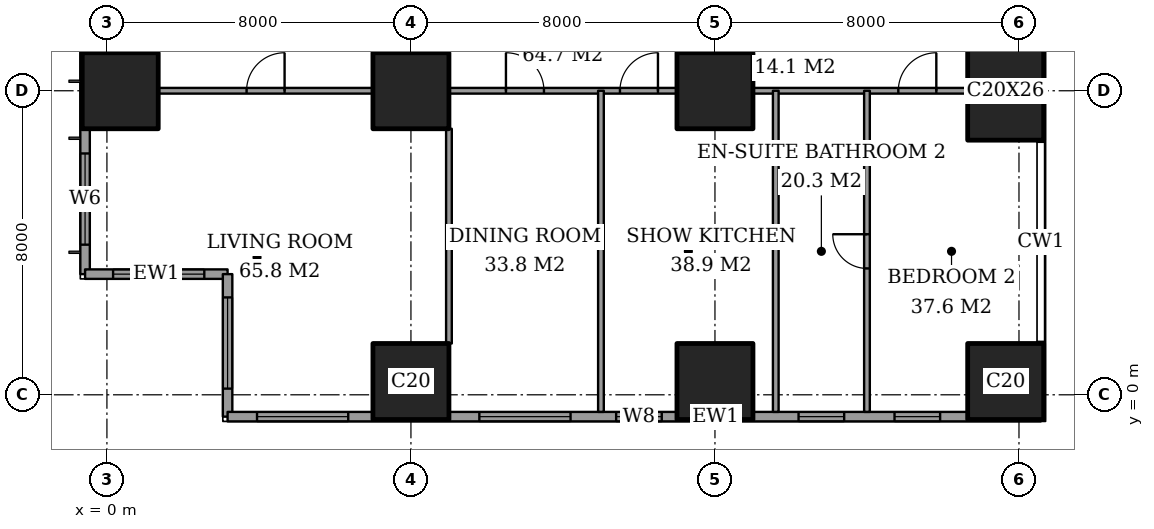
"""IFC4 building model, lengths in metres.
Left out: names, types, materials, properties, quantities, classifications, styles, units other than length and angle.
Written with IfcOpenShell. Run it as: python <this file> out.ifc"""

import sys

from ifc_helpers import new_model, si_unit, direction, frame, frame_2d, origin, origin_2d, place, context, subcontext, project, spatial, rectangle, extrude, element, fill, save


model = new_model("IFC4")
c1 = context("Model", 3, precision=1e-05, world=origin(), true_north=direction((0.0, 1.0)))
c2 = subcontext(c1, "Body", "Model", "MODEL_VIEW")
j1 = project(units=[si_unit("LENGTHUNIT", "METRE"), si_unit("PLANEANGLEUNIT", "RADIAN")], contexts=[c1])
p1 = place(None, origin())
s1 = spatial("IfcSite", under=j1, at=p1, CompositionType="ELEMENT")
p2 = place(p1, origin())
s2 = spatial("IfcBuilding", under=s1, at=p2, CompositionType="ELEMENT")
p3 = place(p2, frame((0.0, 0.0, 54.8)))
s3 = spatial("IfcBuildingStorey", under=s2, at=p3, CompositionType="ELEMENT", Elevation=54.8)
for number, where, z_axis, x_axis in (
    (1, (0.35, 8.0, 0.0), (0.0, 0.0, 1.0), (1.0, 0.0, 0.0)),
    (2, (8.0, 0.35, 0.0), (0.0, 0.0, 1.0), (1.0, 0.0, 0.0)),
    (3, (8.0, 8.0, 0.0), (0.0, 0.0, 1.0), (1.0, 0.0, 0.0)),
    (4, (16.0, 0.35, 0.0), (0.0, 0.0, 1.0), (1.0, 0.0, 0.0)),
    (5, (16.0, 8.0, 0.0), (0.0, 0.0, 1.0), (1.0, 0.0, 0.0)),
    (6, (23.65, 0.35, 0.0), (0.0, 0.0, 1.0), (1.0, 0.0, 0.0)),
):
    element("IfcColumn", number, at=place(p3, frame(where, z_axis=z_axis, x_axis=x_axis)), inside=s3, PredefinedType="COLUMN", context=c2, shape_type="SweptSolid", body=[
        extrude(rectangle(XDim=2.0, YDim=2.0, at=origin_2d()), origin(), (0.0, 0.0, 1.0), 3.6),
    ])
p4 = place(p3, frame((23.65, 8.0, 0.0), z_axis=(0.0, 0.0, 1.0), x_axis=(1.0, 0.0, 0.0)))
e7 = element("IfcColumn", 7, at=p4, inside=s3, PredefinedType="COLUMN", context=c2, shape_type="SweptSolid", body=[
    extrude(rectangle(XDim=2.0, YDim=2.6, at=origin_2d()), origin(), (0.0, 0.0, 1.0), 3.6),
])
p5 = place(p3, frame((-0.575, 44.825, 0.0), z_axis=(0.0, 0.0, 1.0), x_axis=(0.0, -1.0, 0.0)))
e8 = element("IfcWall", 8, at=p5, inside=s3, PredefinedType="SOLIDWALL", context=c2, shape_type="SweptSolid", body=[
    extrude(rectangle(XDim=41.65, YDim=0.25, at=frame_2d((20.825, 0.0))), origin(), (0.0, 0.0, 1.0), 3.6),
])
p6 = place(p5, frame((0.775, 0.0, 0.6)))
e9 = element("IfcOpeningElement", 9, at=p6, cuts=e8, PredefinedType="OPENING", context=c2, shape_type="SweptSolid", body=[
    extrude(rectangle(XDim=2.4, YDim=2.0, at=frame_2d((1.2, 1.0))), frame((0.0, 0.135, 0.0), z_axis=(0.0, -1.0, 0.0), x_axis=(1.0, 0.0, 0.0)), (0.0, 0.0, 1.0), 0.27),
])
p7 = place(p5, frame((6.1, 0.0, 0.6)))
e10 = element("IfcOpeningElement", 10, at=p7, cuts=e8, PredefinedType="OPENING", context=c2, shape_type="SweptSolid", body=[
    extrude(rectangle(XDim=1.2, YDim=2.0, at=frame_2d((0.6, 1.0))), frame((0.0, 0.135, 0.0), z_axis=(0.0, -1.0, 0.0), x_axis=(1.0, 0.0, 0.0)), (0.0, 0.0, 1.0), 0.27),
])
p8 = place(p5, frame((8.425, 0.0, 0.6)))
e11 = element("IfcOpeningElement", 11, at=p8, cuts=e8, PredefinedType="OPENING", context=c2, shape_type="SweptSolid", body=[
    extrude(rectangle(XDim=2.4, YDim=2.0, at=frame_2d((1.2, 1.0))), frame((0.0, 0.135, 0.0), z_axis=(0.0, -1.0, 0.0), x_axis=(1.0, 0.0, 0.0)), (0.0, 0.0, 1.0), 0.27),
])
p9 = place(p5, frame((15.625, 0.0, 0.6)))
e12 = element("IfcOpeningElement", 12, at=p9, cuts=e8, PredefinedType="OPENING", context=c2, shape_type="SweptSolid", body=[
    extrude(rectangle(XDim=2.4, YDim=2.0, at=frame_2d((1.2, 1.0))), frame((0.0, 0.135, 0.0), z_axis=(0.0, -1.0, 0.0), x_axis=(1.0, 0.0, 0.0)), (0.0, 0.0, 1.0), 0.27),
])
p10 = place(p5, frame((23.625, 0.0, 0.6)))
e13 = element("IfcOpeningElement", 13, at=p10, cuts=e8, PredefinedType="OPENING", context=c2, shape_type="SweptSolid", body=[
    extrude(rectangle(XDim=2.4, YDim=2.0, at=frame_2d((1.2, 1.0))), frame((0.0, 0.135, 0.0), z_axis=(0.0, -1.0, 0.0), x_axis=(1.0, 0.0, 0.0)), (0.0, 0.0, 1.0), 0.27),
])
p11 = place(p5, frame((30.825, 0.0, 0.6)))
e14 = element("IfcOpeningElement", 14, at=p11, cuts=e8, PredefinedType="OPENING", context=c2, shape_type="SweptSolid", body=[
    extrude(rectangle(XDim=2.4, YDim=2.0, at=frame_2d((1.2, 1.0))), frame((0.0, 0.135, 0.0), z_axis=(0.0, -1.0, 0.0), x_axis=(1.0, 0.0, 0.0)), (0.0, 0.0, 1.0), 0.27),
])
p12 = place(p5, frame((34.5, 0.0, 0.6)))
e15 = element("IfcOpeningElement", 15, at=p12, cuts=e8, PredefinedType="OPENING", context=c2, shape_type="SweptSolid", body=[
    extrude(rectangle(XDim=1.2, YDim=2.0, at=frame_2d((0.6, 1.0))), frame((0.0, 0.135, 0.0), z_axis=(0.0, -1.0, 0.0), x_axis=(1.0, 0.0, 0.0)), (0.0, 0.0, 1.0), 0.27),
])
p13 = place(p5, frame((38.475, 0.0, 0.6)))
e16 = element("IfcOpeningElement", 16, at=p13, cuts=e8, PredefinedType="OPENING", context=c2, shape_type="SweptSolid", body=[
    extrude(rectangle(XDim=2.4, YDim=2.0, at=frame_2d((1.2, 1.0))), frame((0.0, 0.135, 0.0), z_axis=(0.0, -1.0, 0.0), x_axis=(1.0, 0.0, 0.0)), (0.0, 0.0, 1.0), 0.27),
])
p14 = place(p3, frame((-0.575, 3.175, 0.0), z_axis=(0.0, 0.0, 1.0), x_axis=(1.0, 0.0, 0.0)))
e17 = element("IfcWall", 17, at=p14, inside=s3, PredefinedType="SOLIDWALL", context=c2, shape_type="SweptSolid", body=[
    extrude(rectangle(XDim=3.75, YDim=0.25, at=frame_2d((1.875, 0.0))), origin(), (0.0, 0.0, 1.0), 3.6),
])
p15 = place(p14, frame((0.738, 0.0, 0.6)))
e18 = element("IfcOpeningElement", 18, at=p15, cuts=e17, PredefinedType="OPENING", context=c2, shape_type="SweptSolid", body=[
    extrude(rectangle(XDim=2.4, YDim=2.0, at=frame_2d((1.2, 1.0))), frame((0.0, 0.135, 0.0), z_axis=(0.0, -1.0, 0.0), x_axis=(1.0, 0.0, 0.0)), (0.0, 0.0, 1.0), 0.27),
])
p16 = place(p3, frame((3.175, 3.175, 0.0), z_axis=(0.0, 0.0, 1.0), x_axis=(0.0, -1.0, 0.0)))
e19 = element("IfcWall", 19, at=p16, inside=s3, PredefinedType="SOLIDWALL", context=c2, shape_type="SweptSolid", body=[
    extrude(rectangle(XDim=3.75, YDim=0.25, at=frame_2d((1.875, 0.0))), origin(), (0.0, 0.0, 1.0), 3.6),
])
p17 = place(p16, frame((0.613, 0.0, 0.6)))
e20 = element("IfcOpeningElement", 20, at=p17, cuts=e19, PredefinedType="OPENING", context=c2, shape_type="SweptSolid", body=[
    extrude(rectangle(XDim=2.4, YDim=2.0, at=frame_2d((1.2, 1.0))), frame((0.0, 0.135, 0.0), z_axis=(0.0, -1.0, 0.0), x_axis=(1.0, 0.0, 0.0)), (0.0, 0.0, 1.0), 0.27),
])
p18 = place(p3, frame((3.175, -0.575, 0.0), z_axis=(0.0, 0.0, 1.0), x_axis=(1.0, 0.0, 0.0)))
e21 = element("IfcWall", 21, at=p18, inside=s3, PredefinedType="SOLIDWALL", context=c2, shape_type="SweptSolid", body=[
    extrude(rectangle(XDim=21.4, YDim=0.25, at=frame_2d((10.7, 0.0))), origin(), (0.0, 0.0, 1.0), 3.6),
])
p19 = place(p18, frame((0.775, 0.0, 0.6)))
e22 = element("IfcOpeningElement", 22, at=p19, cuts=e21, PredefinedType="OPENING", context=c2, shape_type="SweptSolid", body=[
    extrude(rectangle(XDim=2.4, YDim=2.0, at=frame_2d((1.2, 1.0))), frame((0.0, 0.135, 0.0), z_axis=(0.0, -1.0, 0.0), x_axis=(1.0, 0.0, 0.0)), (0.0, 0.0, 1.0), 0.27),
])
p20 = place(p18, frame((6.625, 0.0, 0.6)))
e23 = element("IfcOpeningElement", 23, at=p20, cuts=e21, PredefinedType="OPENING", context=c2, shape_type="SweptSolid", body=[
    extrude(rectangle(XDim=2.4, YDim=2.0, at=frame_2d((1.2, 1.0))), frame((0.0, 0.135, 0.0), z_axis=(0.0, -1.0, 0.0), x_axis=(1.0, 0.0, 0.0)), (0.0, 0.0, 1.0), 0.27),
])
p21 = place(p18, frame((10.225, 0.0, 0.6)))
e24 = element("IfcOpeningElement", 24, at=p21, cuts=e21, PredefinedType="OPENING", context=c2, shape_type="SweptSolid", body=[
    extrude(rectangle(XDim=1.2, YDim=2.0, at=frame_2d((0.6, 1.0))), frame((0.0, 0.135, 0.0), z_axis=(0.0, -1.0, 0.0), x_axis=(1.0, 0.0, 0.0)), (0.0, 0.0, 1.0), 0.27),
])
p22 = place(p18, frame((15.025, 0.0, 0.6)))
e25 = element("IfcOpeningElement", 25, at=p22, cuts=e21, PredefinedType="OPENING", context=c2, shape_type="SweptSolid", body=[
    extrude(rectangle(XDim=1.2, YDim=2.0, at=frame_2d((0.6, 1.0))), frame((0.0, 0.135, 0.0), z_axis=(0.0, -1.0, 0.0), x_axis=(1.0, 0.0, 0.0)), (0.0, 0.0, 1.0), 0.27),
])
p23 = place(p18, frame((17.55, 0.0, 0.6)))
e26 = element("IfcOpeningElement", 26, at=p23, cuts=e21, PredefinedType="OPENING", context=c2, shape_type="SweptSolid", body=[
    extrude(rectangle(XDim=1.2, YDim=2.0, at=frame_2d((0.6, 1.0))), frame((0.0, 0.135, 0.0), z_axis=(0.0, -1.0, 0.0), x_axis=(1.0, 0.0, 0.0)), (0.0, 0.0, 1.0), 0.27),
])
p24 = place(p3, frame((1.35, 8.0, 0.0), z_axis=(0.0, 0.0, 1.0), x_axis=(1.0, 0.0, 0.0)))
e27 = element("IfcWall", 27, at=p24, inside=s3, PredefinedType="PARTITIONING", context=c2, shape_type="SweptSolid", body=[
    extrude(rectangle(XDim=5.65, YDim=0.15, at=frame_2d((2.825, 0.0))), origin(), (0.0, 0.0, 1.0), 3.35),
])
p25 = place(p24, frame((2.325, 0.0, 0.0)))
e28 = element("IfcOpeningElement", 28, at=p25, cuts=e27, PredefinedType="OPENING", context=c2, shape_type="SweptSolid", body=[
    extrude(rectangle(XDim=1.0, YDim=2.1, at=frame_2d((0.5, 1.05))), frame((0.0, 0.085, 0.0), z_axis=(0.0, -1.0, 0.0), x_axis=(1.0, 0.0, 0.0)), (0.0, 0.0, 1.0), 0.17),
])
p26 = place(p3, frame((9.0, 8.0, 0.0), z_axis=(0.0, 0.0, 1.0), x_axis=(1.0, 0.0, 0.0)))
e29 = element("IfcWall", 29, at=p26, inside=s3, PredefinedType="PARTITIONING", context=c2, shape_type="SweptSolid", body=[
    extrude(rectangle(XDim=6.0, YDim=0.15, at=frame_2d((3.0, 0.0))), origin(), (0.0, 0.0, 1.0), 3.35),
])
p27 = place(p26, frame((1.5, 0.0, 0.0)))
e30 = element("IfcOpeningElement", 30, at=p27, cuts=e29, PredefinedType="OPENING", context=c2, shape_type="SweptSolid", body=[
    extrude(rectangle(XDim=1.0, YDim=2.1, at=frame_2d((0.5, 1.05))), frame((0.0, 0.085, 0.0), z_axis=(0.0, -1.0, 0.0), x_axis=(1.0, 0.0, 0.0)), (0.0, 0.0, 1.0), 0.17),
])
p28 = place(p26, frame((4.5, 0.0, 0.0)))
e31 = element("IfcOpeningElement", 31, at=p28, cuts=e29, PredefinedType="OPENING", context=c2, shape_type="SweptSolid", body=[
    extrude(rectangle(XDim=1.0, YDim=2.1, at=frame_2d((0.5, 1.05))), frame((0.0, 0.085, 0.0), z_axis=(0.0, -1.0, 0.0), x_axis=(1.0, 0.0, 0.0)), (0.0, 0.0, 1.0), 0.17),
])
p29 = place(p3, frame((17.0, 8.0, 0.0), z_axis=(0.0, 0.0, 1.0), x_axis=(1.0, 0.0, 0.0)))
e32 = element("IfcWall", 32, at=p29, inside=s3, PredefinedType="PARTITIONING", context=c2, shape_type="SweptSolid", body=[
    extrude(rectangle(XDim=5.65, YDim=0.15, at=frame_2d((2.825, 0.0))), origin(), (0.0, 0.0, 1.0), 3.35),
])
p30 = place(p29, frame((3.825, 0.0, 0.0)))
e33 = element("IfcOpeningElement", 33, at=p30, cuts=e32, PredefinedType="OPENING", context=c2, shape_type="SweptSolid", body=[
    extrude(rectangle(XDim=1.0, YDim=2.1, at=frame_2d((0.5, 1.05))), frame((0.0, 0.085, 0.0), z_axis=(0.0, -1.0, 0.0), x_axis=(1.0, 0.0, 0.0)), (0.0, 0.0, 1.0), 0.17),
])
p31 = place(p3, frame((9.0, 1.35, 0.0), z_axis=(0.0, 0.0, 1.0), x_axis=(0.0, 1.0, 0.0)))
e34 = element("IfcWall", 34, at=p31, inside=s3, PredefinedType="PARTITIONING", context=c2, shape_type="SweptSolid", body=[
    extrude(rectangle(XDim=5.65, YDim=0.15, at=frame_2d((2.825, 0.0))), origin(), (0.0, 0.0, 1.0), 3.35),
])
for number, where, z_axis, x_axis in (
    (35, (13.0, -0.45, 0.0), (0.0, 0.0, 1.0), (0.0, 1.0, 0.0)),
    (36, (17.6, -0.45, 0.0), (0.0, 0.0, 1.0), (0.0, 1.0, 0.0)),
):
    element("IfcWall", number, at=place(p3, frame(where, z_axis=z_axis, x_axis=x_axis)), inside=s3, PredefinedType="PARTITIONING", context=c2, shape_type="SweptSolid", body=[
        extrude(rectangle(XDim=8.45, YDim=0.15, at=frame_2d((4.225, 0.0))), origin(), (0.0, 0.0, 1.0), 3.35),
    ])
p32 = place(p3, frame((20.0, -0.45, 0.0), z_axis=(0.0, 0.0, 1.0), x_axis=(0.0, 1.0, 0.0)))
e37 = element("IfcWall", 37, at=p32, inside=s3, PredefinedType="PARTITIONING", context=c2, shape_type="SweptSolid", body=[
    extrude(rectangle(XDim=8.45, YDim=0.15, at=frame_2d((4.225, 0.0))), origin(), (0.0, 0.0, 1.0), 3.35),
])
p33 = place(p32, frame((3.775, 0.0, 0.0)))
e38 = element("IfcOpeningElement", 38, at=p33, cuts=e37, PredefinedType="OPENING", context=c2, shape_type="SweptSolid", body=[
    extrude(rectangle(XDim=0.9, YDim=2.1, at=frame_2d((0.45, 1.05))), frame((0.0, 0.085, 0.0), z_axis=(0.0, -1.0, 0.0), x_axis=(1.0, 0.0, 0.0)), (0.0, 0.0, 1.0), 0.17),
])
p34 = place(p13, origin())
e39 = element("IfcWindow", 39, at=p34, inside=s3, PartitioningType="SINGLE_PANEL", PredefinedType="WINDOW", context=c2, shape_type="SweptSolid", body=[
    extrude(rectangle(XDim=2.4, YDim=2.0, at=frame_2d((1.2, 1.0))), frame((0.0, 0.03, 0.0), z_axis=(0.0, -1.0, 0.0), x_axis=(1.0, 0.0, 0.0)), (0.0, 0.0, 1.0), 0.06),
])
fill(e16, e39)
p35 = place(p15, origin())
e40 = element("IfcWindow", 40, at=p35, inside=s3, PartitioningType="SINGLE_PANEL", PredefinedType="WINDOW", context=c2, shape_type="SweptSolid", body=[
    extrude(rectangle(XDim=2.4, YDim=2.0, at=frame_2d((1.2, 1.0))), frame((0.0, 0.03, 0.0), z_axis=(0.0, -1.0, 0.0), x_axis=(1.0, 0.0, 0.0)), (0.0, 0.0, 1.0), 0.06),
])
fill(e18, e40)
p36 = place(p17, origin())
e41 = element("IfcWindow", 41, at=p36, inside=s3, PartitioningType="SINGLE_PANEL", PredefinedType="WINDOW", context=c2, shape_type="SweptSolid", body=[
    extrude(rectangle(XDim=2.4, YDim=2.0, at=frame_2d((1.2, 1.0))), frame((0.0, 0.03, 0.0), z_axis=(0.0, -1.0, 0.0), x_axis=(1.0, 0.0, 0.0)), (0.0, 0.0, 1.0), 0.06),
])
fill(e20, e41)
p37 = place(p19, origin())
e42 = element("IfcWindow", 42, at=p37, inside=s3, PartitioningType="SINGLE_PANEL", PredefinedType="WINDOW", context=c2, shape_type="SweptSolid", body=[
    extrude(rectangle(XDim=2.4, YDim=2.0, at=frame_2d((1.2, 1.0))), frame((0.0, 0.03, 0.0), z_axis=(0.0, -1.0, 0.0), x_axis=(1.0, 0.0, 0.0)), (0.0, 0.0, 1.0), 0.06),
])
fill(e22, e42)
p38 = place(p20, origin())
e43 = element("IfcWindow", 43, at=p38, inside=s3, PartitioningType="SINGLE_PANEL", PredefinedType="WINDOW", context=c2, shape_type="SweptSolid", body=[
    extrude(rectangle(XDim=2.4, YDim=2.0, at=frame_2d((1.2, 1.0))), frame((0.0, 0.03, 0.0), z_axis=(0.0, -1.0, 0.0), x_axis=(1.0, 0.0, 0.0)), (0.0, 0.0, 1.0), 0.06),
])
fill(e23, e43)
p39 = place(p21, origin())
e44 = element("IfcWindow", 44, at=p39, inside=s3, PartitioningType="SINGLE_PANEL", PredefinedType="WINDOW", context=c2, shape_type="SweptSolid", body=[
    extrude(rectangle(XDim=1.2, YDim=2.0, at=frame_2d((0.6, 1.0))), frame((0.0, 0.03, 0.0), z_axis=(0.0, -1.0, 0.0), x_axis=(1.0, 0.0, 0.0)), (0.0, 0.0, 1.0), 0.06),
])
fill(e24, e44)
p40 = place(p22, origin())
e45 = element("IfcWindow", 45, at=p40, inside=s3, PartitioningType="SINGLE_PANEL", PredefinedType="WINDOW", context=c2, shape_type="SweptSolid", body=[
    extrude(rectangle(XDim=1.2, YDim=2.0, at=frame_2d((0.6, 1.0))), frame((0.0, 0.03, 0.0), z_axis=(0.0, -1.0, 0.0), x_axis=(1.0, 0.0, 0.0)), (0.0, 0.0, 1.0), 0.06),
])
fill(e25, e45)
p41 = place(p23, origin())
e46 = element("IfcWindow", 46, at=p41, inside=s3, PartitioningType="SINGLE_PANEL", PredefinedType="WINDOW", context=c2, shape_type="SweptSolid", body=[
    extrude(rectangle(XDim=1.2, YDim=2.0, at=frame_2d((0.6, 1.0))), frame((0.0, 0.03, 0.0), z_axis=(0.0, -1.0, 0.0), x_axis=(1.0, 0.0, 0.0)), (0.0, 0.0, 1.0), 0.06),
])
fill(e26, e46)
p42 = place(p25, origin())
e47 = element("IfcDoor", 47, at=p42, inside=s3, OperationType="SINGLE_SWING_LEFT", PredefinedType="DOOR", context=c2, shape_type="SweptSolid", body=[
    extrude(rectangle(XDim=1.0, YDim=2.1, at=frame_2d((0.5, 1.05))), frame((0.0, 0.025, 0.0), z_axis=(0.0, -1.0, 0.0), x_axis=(1.0, 0.0, 0.0)), (0.0, 0.0, 1.0), 0.05),
])
fill(e28, e47)
p43 = place(p27, origin())
e48 = element("IfcDoor", 48, at=p43, inside=s3, OperationType="SINGLE_SWING_RIGHT", PredefinedType="DOOR", context=c2, shape_type="SweptSolid", body=[
    extrude(rectangle(XDim=1.0, YDim=2.1, at=frame_2d((0.5, 1.05))), frame((0.0, 0.025, 0.0), z_axis=(0.0, -1.0, 0.0), x_axis=(1.0, 0.0, 0.0)), (0.0, 0.0, 1.0), 0.05),
])
fill(e30, e48)
p44 = place(p28, origin())
e49 = element("IfcDoor", 49, at=p44, inside=s3, OperationType="SINGLE_SWING_LEFT", PredefinedType="DOOR", context=c2, shape_type="SweptSolid", body=[
    extrude(rectangle(XDim=1.0, YDim=2.1, at=frame_2d((0.5, 1.05))), frame((0.0, 0.025, 0.0), z_axis=(0.0, -1.0, 0.0), x_axis=(1.0, 0.0, 0.0)), (0.0, 0.0, 1.0), 0.05),
])
fill(e31, e49)
p45 = place(p33, origin())
e50 = element("IfcDoor", 50, at=p45, inside=s3, OperationType="SINGLE_SWING_LEFT", PredefinedType="DOOR", context=c2, shape_type="SweptSolid", body=[
    extrude(rectangle(XDim=0.9, YDim=2.1, at=frame_2d((0.45, 1.05))), frame((0.0, 0.025, 0.0), z_axis=(0.0, -1.0, 0.0), x_axis=(1.0, 0.0, 0.0)), (0.0, 0.0, 1.0), 0.05),
])
fill(e38, e50)
p46 = place(p30, origin())
e51 = element("IfcDoor", 51, at=p46, inside=s3, OperationType="SINGLE_SWING_LEFT", PredefinedType="DOOR", context=c2, shape_type="SweptSolid", body=[
    extrude(rectangle(XDim=1.0, YDim=2.1, at=frame_2d((0.5, 1.05))), frame((0.0, 0.025, 0.0), z_axis=(0.0, -1.0, 0.0), x_axis=(1.0, 0.0, 0.0)), (0.0, 0.0, 1.0), 0.05),
])
fill(e33, e51)
save(model, sys.argv[1])
